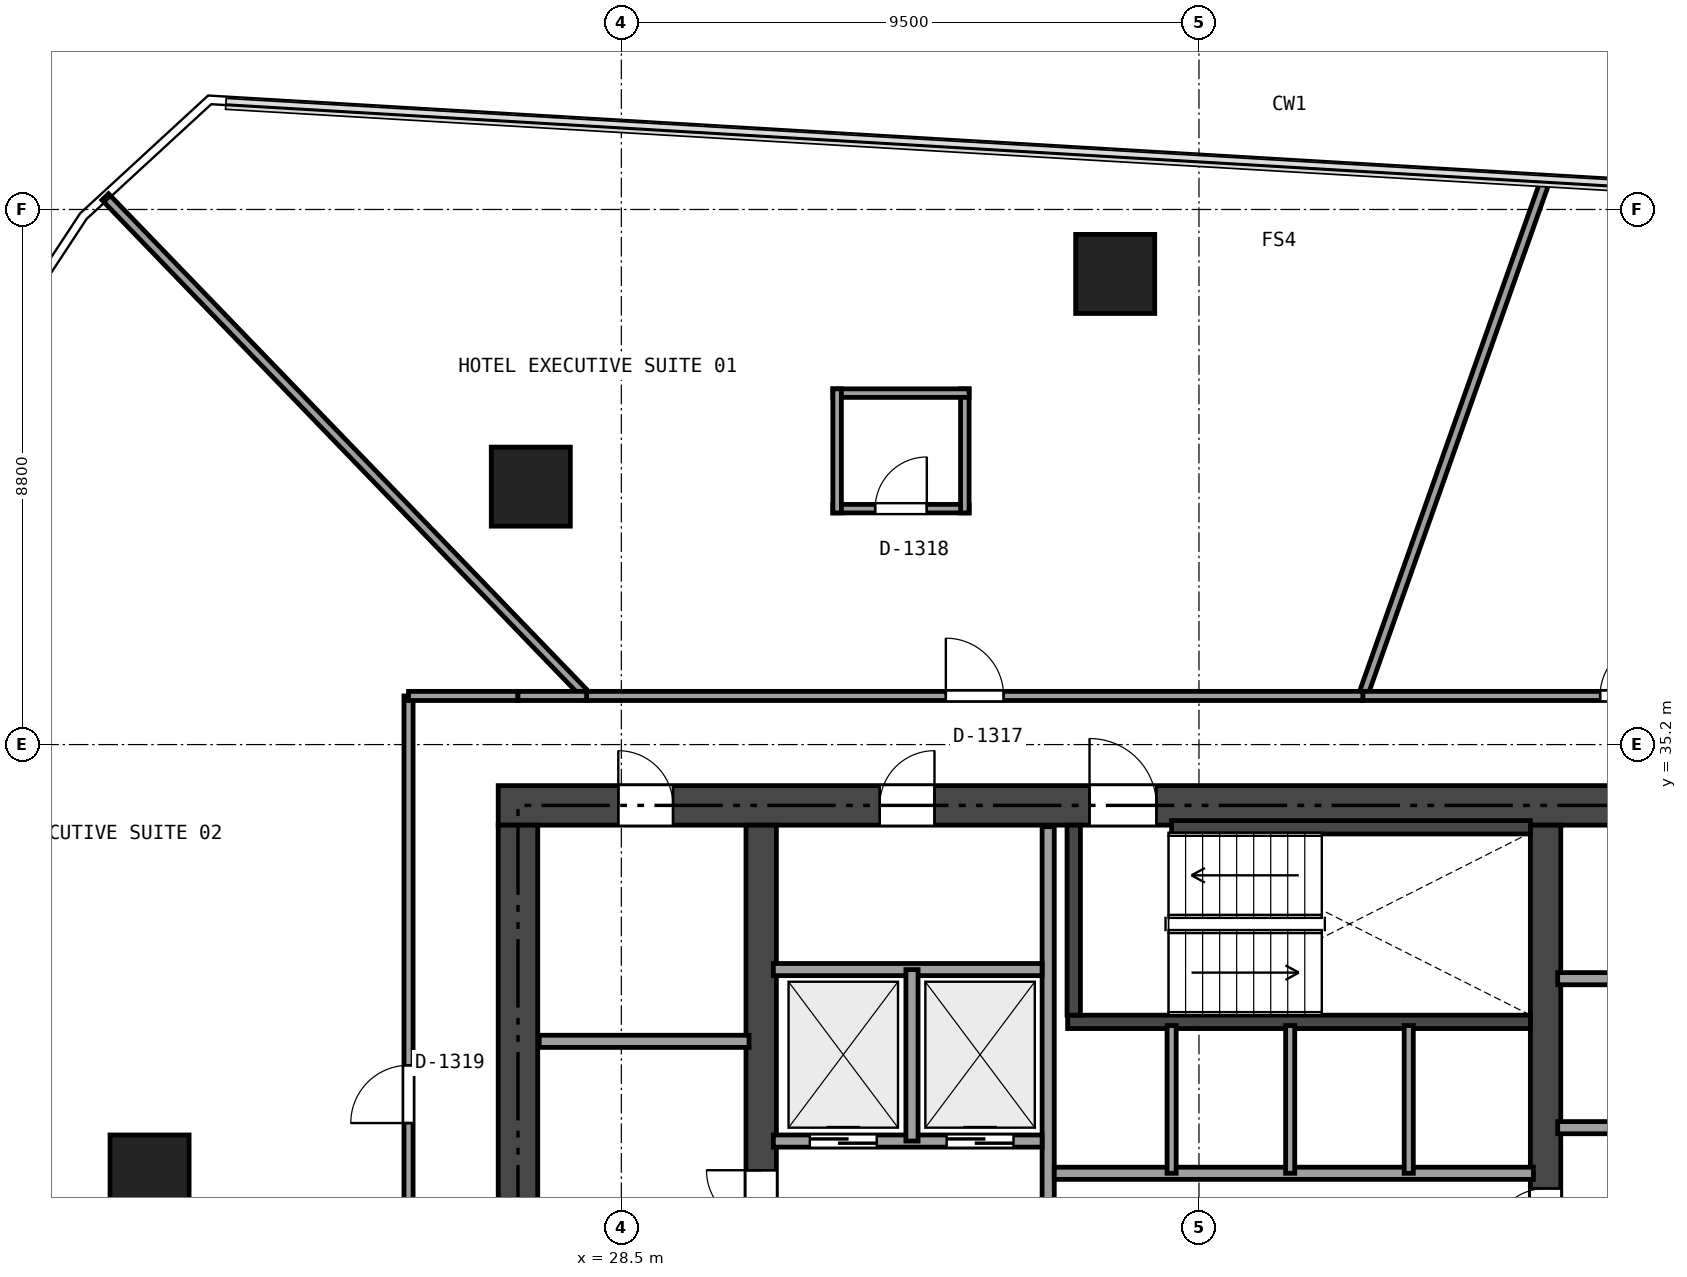
"""IFC4 building model, lengths in metres.
Left out: names, types, materials, properties, quantities, classifications, styles, units other than length and angle.
Written with IfcOpenShell. Run it as: python <this file> out.ifc"""

import sys

from ifc_helpers import new_model, si_unit, direction, frame, frame_2d, origin, origin_2d, place, context, subcontext, project, spatial, rectangle, extrude, element, fill, save


model = new_model("IFC4")
c1 = context("Model", 3, precision=1e-05, world=origin(), true_north=direction((0.0, 1.0)))
c2 = subcontext(c1, "Body", "Model", "MODEL_VIEW")
j1 = project(units=[si_unit("LENGTHUNIT", "METRE"), si_unit("PLANEANGLEUNIT", "RADIAN")], contexts=[c1])
p1 = place(None, origin())
s1 = spatial("IfcSite", under=j1, at=p1, CompositionType="ELEMENT")
p2 = place(p1, origin())
s2 = spatial("IfcBuilding", under=s1, at=p2, CompositionType="ELEMENT")
p3 = place(p2, frame((0.0, 0.0, 54.6)))
s3 = spatial("IfcBuildingStorey", under=s2, at=p3, CompositionType="ELEMENT", Elevation=54.6)
p4 = place(p3, frame((26.475, 34.2, 0.0), z_axis=(0.0, 0.0, 1.0), x_axis=(1.0, 0.0, 0.0)))
e1 = element("IfcWall", 1, at=p4, inside=s3, PredefinedType="SHEAR", context=c2, shape_type="SweptSolid", body=[
    extrude(rectangle(XDim=21.45, YDim=0.65, at=frame_2d((10.725, 0.0))), origin(), (0.0, 0.0, 1.0), 3.17),
])
p5 = place(p4, frame((9.725, 0.0, 0.0)))
e2 = element("IfcOpeningElement", 2, at=p5, cuts=e1, PredefinedType="OPENING", context=c2, shape_type="SweptSolid", body=[
    extrude(rectangle(XDim=1.1, YDim=2.15, at=frame_2d((0.55, 1.075))), frame((0.0, 0.335, 0.0), z_axis=(0.0, -1.0, 0.0), x_axis=(1.0, 0.0, 0.0)), (0.0, 0.0, 1.0), 0.67),
])
p6 = place(p4, frame((1.975, 0.0, 0.0)))
e3 = element("IfcOpeningElement", 3, at=p6, cuts=e1, PredefinedType="OPENING", context=c2, shape_type="SweptSolid", body=[
    extrude(rectangle(XDim=0.9, YDim=2.1, at=frame_2d((0.45, 1.05))), frame((0.0, 0.335, 0.0), z_axis=(0.0, -1.0, 0.0), x_axis=(1.0, 0.0, 0.0)), (0.0, 0.0, 1.0), 0.67),
])
p7 = place(p4, frame((6.275, 0.0, 0.0)))
e4 = element("IfcOpeningElement", 4, at=p7, cuts=e1, PredefinedType="OPENING", context=c2, shape_type="SweptSolid", body=[
    extrude(rectangle(XDim=0.9, YDim=2.1, at=frame_2d((0.45, 1.05))), frame((0.0, 0.335, 0.0), z_axis=(0.0, -1.0, 0.0), x_axis=(1.0, 0.0, 0.0)), (0.0, 0.0, 1.0), 0.67),
])
p8 = place(p3, frame((26.8, 18.925, 0.0), z_axis=(0.0, 0.0, 1.0), x_axis=(0.0, 1.0, 0.0)))
e5 = element("IfcWall", 5, at=p8, inside=s3, PredefinedType="SHEAR", context=c2, shape_type="SweptSolid", body=[
    extrude(rectangle(XDim=14.95, YDim=0.65, at=frame_2d((7.475, 0.0))), origin(), (0.0, 0.0, 1.0), 3.17),
])
p9 = place(p3, frame((30.8, 18.925, 0.0), z_axis=(0.0, 0.0, 1.0), x_axis=(0.0, 1.0, 0.0)))
e6 = element("IfcWall", 6, at=p9, inside=s3, PredefinedType="SHEAR", context=c2, shape_type="SweptSolid", body=[
    extrude(rectangle(XDim=14.95, YDim=0.5, at=frame_2d((7.475, 0.0))), origin(), (0.0, 0.0, 1.0), 3.17),
])
p10 = place(p9, frame((6.575, 0.0, 0.0)))
e7 = element("IfcOpeningElement", 7, at=p10, cuts=e6, PredefinedType="OPENING", context=c2, shape_type="SweptSolid", body=[
    extrude(rectangle(XDim=1.1, YDim=2.15, at=frame_2d((0.55, 1.075))), frame((0.0, 0.26, 0.0), z_axis=(0.0, -1.0, 0.0), x_axis=(1.0, 0.0, 0.0)), (0.0, 0.0, 1.0), 0.52),
])
p11 = place(p9, frame((8.375, 0.0, 0.0)))
e8 = element("IfcOpeningElement", 8, at=p11, cuts=e6, PredefinedType="OPENING", context=c2, shape_type="SweptSolid", body=[
    extrude(rectangle(XDim=0.9, YDim=2.1, at=frame_2d((0.45, 1.05))), frame((0.0, 0.26, 0.0), z_axis=(0.0, -1.0, 0.0), x_axis=(1.0, 0.0, 0.0)), (0.0, 0.0, 1.0), 0.52),
])
p12 = place(p3, frame((43.7, 18.925, 0.0), z_axis=(0.0, 0.0, 1.0), x_axis=(0.0, 1.0, 0.0)))
e9 = element("IfcWall", 9, at=p12, inside=s3, PredefinedType="SHEAR", context=c2, shape_type="SweptSolid", body=[
    extrude(rectangle(XDim=14.95, YDim=0.5, at=frame_2d((7.475, 0.0))), origin(), (0.0, 0.0, 1.0), 3.17),
])
p13 = place(p12, frame((8.075, 0.0, 0.0)))
e10 = element("IfcOpeningElement", 10, at=p13, cuts=e9, PredefinedType="OPENING", context=c2, shape_type="SweptSolid", body=[
    extrude(rectangle(XDim=0.9, YDim=2.1, at=frame_2d((0.45, 1.05))), frame((0.0, 0.26, 0.0), z_axis=(0.0, -1.0, 0.0), x_axis=(1.0, 0.0, 0.0)), (0.0, 0.0, 1.0), 0.52),
])
p14 = place(p3, frame((35.84, 30.64, 0.0), z_axis=(0.0, 0.0, 1.0), x_axis=(1.0, 0.0, 0.0)))
e11 = element("IfcWall", 11, at=p14, inside=s3, PredefinedType="SHEAR", context=c2, shape_type="SweptSolid", body=[
    extrude(rectangle(XDim=7.61, YDim=0.22, at=frame_2d((3.805, 0.0))), origin(), (0.0, 0.0, 1.0), 3.17),
])
p15 = place(p3, frame((35.94, 30.75, 0.0), z_axis=(0.0, 0.0, 1.0), x_axis=(0.0, 1.0, 0.0)))
e12 = element("IfcWall", 12, at=p15, inside=s3, PredefinedType="SHEAR", context=c2, shape_type="SweptSolid", body=[
    extrude(rectangle(XDim=3.125, YDim=0.22, at=frame_2d((1.562, 0.0))), origin(), (0.0, 0.0, 1.0), 3.17),
])
p16 = place(p3, frame((37.55, 33.84, 0.0), z_axis=(0.0, 0.0, 1.0), x_axis=(1.0, 0.0, 0.0)))
e13 = element("IfcWall", 13, at=p16, inside=s3, PredefinedType="SHEAR", context=c2, shape_type="SweptSolid", body=[
    extrude(rectangle(XDim=5.9, YDim=0.22, at=frame_2d((2.95, 0.0))), origin(), (0.0, 0.0, 1.0), 3.17),
])
for number, where, z_axis, x_axis in (
    (14, (36.622, 42.94, 0.0), (0.0, 0.0, 1.0), (1.0, 0.0, 0.0)),
    (15, (27.011, 39.442, 0.0), (0.0, 0.0, 1.0), (1.0, 0.0, 0.0)),
    (16, (20.741, 28.13, 0.0), (0.0, 0.0, 1.0), (1.0, 0.0, 0.0)),
):
    element("IfcColumn", number, at=place(p3, frame(where, z_axis=z_axis, x_axis=x_axis)), inside=s3, PredefinedType="COLUMN", context=c2, shape_type="SweptSolid", body=[
        extrude(rectangle(XDim=1.3, YDim=1.3, at=origin_2d()), origin(), (0.0, 0.0, 1.0), 3.17),
    ])
p17 = place(p3, frame((27.15, 30.32, 0.0), z_axis=(0.0, 0.0, 1.0), x_axis=(1.0, 0.0, 0.0)))
e17 = element("IfcWall", 17, at=p17, inside=s3, PredefinedType="SOLIDWALL", context=c2, shape_type="SweptSolid", body=[
    extrude(rectangle(XDim=3.45, YDim=0.2, at=frame_2d((1.725, 0.0))), origin(), (0.0, 0.0, 1.0), 3.17),
])
p18 = place(p3, frame((43.9, 28.9, 0.0), z_axis=(0.0, 0.0, 1.0), x_axis=(1.0, 0.0, 0.0)))
e18 = element("IfcWall", 18, at=p18, inside=s3, PredefinedType="SOLIDWALL", context=c2, shape_type="SweptSolid", body=[
    extrude(rectangle(XDim=3.35, YDim=0.2, at=frame_2d((1.675, 0.0))), origin(), (0.0, 0.0, 1.0), 3.17),
])
p19 = place(p18, frame((1.15, 0.0, 0.0)))
e19 = element("IfcOpeningElement", 19, at=p19, cuts=e18, PredefinedType="OPENING", context=c2, shape_type="SweptSolid", body=[
    extrude(rectangle(XDim=0.9, YDim=2.1, at=frame_2d((0.45, 1.05))), frame((0.0, 0.11, 0.0), z_axis=(0.0, -1.0, 0.0), x_axis=(1.0, 0.0, 0.0)), (0.0, 0.0, 1.0), 0.22),
])
p20 = place(p3, frame((43.9, 31.35, 0.0), z_axis=(0.0, 0.0, 1.0), x_axis=(1.0, 0.0, 0.0)))
e20 = element("IfcWall", 20, at=p20, inside=s3, PredefinedType="SOLIDWALL", context=c2, shape_type="SweptSolid", body=[
    extrude(rectangle(XDim=3.35, YDim=0.2, at=frame_2d((1.675, 0.0))), origin(), (0.0, 0.0, 1.0), 3.17),
])
p21 = place(p3, frame((35.52, 18.95, 0.0), z_axis=(0.0, 0.0, 1.0), x_axis=(0.0, 1.0, 0.0)))
e21 = element("IfcWall", 21, at=p21, inside=s3, PredefinedType="SOLIDWALL", context=c2, shape_type="SweptSolid", body=[
    extrude(rectangle(XDim=14.9, YDim=0.2, at=frame_2d((7.45, 0.0))), origin(), (0.0, 0.0, 1.0), 2.691),
])
p22 = place(p21, frame((7.755, 0.0, 0.0)))
e22 = element("IfcOpeningElement", 22, at=p22, cuts=e21, PredefinedType="OPENING", context=c2, shape_type="SweptSolid", body=[
    extrude(rectangle(XDim=0.95, YDim=2.15, at=frame_2d((0.475, 1.075))), frame((0.0, 0.11, 0.0), z_axis=(0.0, -1.0, 0.0), x_axis=(1.0, 0.0, 0.0)), (0.0, 0.0, 1.0), 0.22),
])
p23 = place(p21, frame((0.6, 0.0, 0.0)))
e23 = element("IfcOpeningElement", 23, at=p23, cuts=e21, PredefinedType="OPENING", context=c2, shape_type="SweptSolid", body=[
    extrude(rectangle(XDim=0.9, YDim=2.1, at=frame_2d((0.45, 1.05))), frame((0.0, 0.11, 0.0), z_axis=(0.0, -1.0, 0.0), x_axis=(1.0, 0.0, 0.0)), (0.0, 0.0, 1.0), 0.22),
])
p24 = place(p3, frame((31.0, 28.68, 0.0), z_axis=(0.0, 0.0, 1.0), x_axis=(1.0, 0.0, 0.0)))
e24 = element("IfcWall", 24, at=p24, inside=s3, PredefinedType="SOLIDWALL", context=c2, shape_type="SweptSolid", body=[
    extrude(rectangle(XDim=4.42, YDim=0.2, at=frame_2d((2.21, 0.0))), origin(), (0.0, 0.0, 1.0), 3.17),
])
p25 = place(p24, frame((0.6, 0.0, 0.0)))
e25 = element("IfcOpeningElement", 25, at=p25, cuts=e24, PredefinedType="OPENING", context=c2, shape_type="SweptSolid", body=[
    extrude(rectangle(XDim=1.1, YDim=2.15, at=frame_2d((0.55, 1.075))), frame((0.0, 0.11, 0.0), z_axis=(0.0, -1.0, 0.0), x_axis=(1.0, 0.0, 0.0)), (0.0, 0.0, 1.0), 0.22),
])
p26 = place(p24, frame((2.85, 0.0, 0.0)))
e26 = element("IfcOpeningElement", 26, at=p26, cuts=e24, PredefinedType="OPENING", context=c2, shape_type="SweptSolid", body=[
    extrude(rectangle(XDim=1.1, YDim=2.15, at=frame_2d((0.55, 1.075))), frame((0.0, 0.11, 0.0), z_axis=(0.0, -1.0, 0.0), x_axis=(1.0, 0.0, 0.0)), (0.0, 0.0, 1.0), 0.22),
])
p27 = place(p3, frame((31.0, 31.5, 0.0), z_axis=(0.0, 0.0, 1.0), x_axis=(1.0, 0.0, 0.0)))
e27 = element("IfcWall", 27, at=p27, inside=s3, PredefinedType="SOLIDWALL", context=c2, shape_type="SweptSolid", body=[
    extrude(rectangle(XDim=4.42, YDim=0.2, at=frame_2d((2.21, 0.0))), origin(), (0.0, 0.0, 1.0), 3.17),
])
p28 = place(p3, frame((33.28, 28.68, 0.0), z_axis=(0.0, 0.0, 1.0), x_axis=(0.0, 1.0, 0.0)))
e28 = element("IfcWall", 28, at=p28, inside=s3, PredefinedType="SOLIDWALL", context=c2, shape_type="SweptSolid", body=[
    extrude(rectangle(XDim=2.82, YDim=0.2, at=frame_2d((1.41, 0.0))), origin(), (0.0, 0.0, 1.0), 3.17),
])
p29 = place(p3, frame((35.62, 28.15, 0.0), z_axis=(0.0, 0.0, 1.0), x_axis=(1.0, 0.0, 0.0)))
e29 = element("IfcWall", 29, at=p29, inside=s3, PredefinedType="SOLIDWALL", context=c2, shape_type="SweptSolid", body=[
    extrude(rectangle(XDim=7.88, YDim=0.2, at=frame_2d((3.94, 0.0))), origin(), (0.0, 0.0, 1.0), 3.17),
])
for number, where, z_axis, x_axis in (
    (30, (37.55, 28.15, 0.0), (0.0, 0.0, 1.0), (0.0, 1.0, 0.0)),
    (31, (39.5, 28.15, 0.0), (0.0, 0.0, 1.0), (0.0, 1.0, 0.0)),
    (32, (41.45, 28.15, 0.0), (0.0, 0.0, 1.0), (0.0, 1.0, 0.0)),
):
    element("IfcWall", number, at=place(p3, frame(where, z_axis=z_axis, x_axis=x_axis)), inside=s3, PredefinedType="PARTITIONING", context=c2, shape_type="SweptSolid", body=[
        extrude(rectangle(XDim=2.43, YDim=0.15, at=frame_2d((1.215, 0.0))), origin(), (0.0, 0.0, 1.0), 3.17),
    ])
p30 = place(p3, frame((31.979, 39.08, 0.0), z_axis=(0.0, 0.0, 1.0), x_axis=(1.0, 0.0, 0.0)))
e33 = element("IfcWall", 33, at=p30, inside=s3, PredefinedType="PARTITIONING", context=c2, shape_type="SweptSolid", body=[
    extrude(rectangle(XDim=2.24, YDim=0.14, at=frame_2d((1.12, 0.0))), origin(), (0.0, 0.0, 1.0), 2.747),
])
p31 = place(p30, frame((0.695, 0.0, 0.0)))
e34 = element("IfcOpeningElement", 34, at=p31, cuts=e33, PredefinedType="OPENING", context=c2, shape_type="SweptSolid", body=[
    extrude(rectangle(XDim=0.85, YDim=2.1, at=frame_2d((0.425, 1.05))), frame((0.0, 0.08, 0.0), z_axis=(0.0, -1.0, 0.0), x_axis=(1.0, 0.0, 0.0)), (0.0, 0.0, 1.0), 0.16),
])
p32 = place(p3, frame((34.149, 39.01, 0.0), z_axis=(0.0, 0.0, 1.0), x_axis=(0.0, 1.0, 0.0)))
e35 = element("IfcWall", 35, at=p32, inside=s3, PredefinedType="PARTITIONING", context=c2, shape_type="SweptSolid", body=[
    extrude(rectangle(XDim=2.04, YDim=0.14, at=frame_2d((1.02, 0.0))), origin(), (0.0, 0.0, 1.0), 2.747),
])
p33 = place(p3, frame((34.219, 40.98, 0.0), z_axis=(0.0, 0.0, 1.0), x_axis=(-1.0, 0.0, 0.0)))
e36 = element("IfcWall", 36, at=p33, inside=s3, PredefinedType="PARTITIONING", context=c2, shape_type="SweptSolid", body=[
    extrude(rectangle(XDim=2.24, YDim=0.14, at=frame_2d((1.12, 0.0))), origin(), (0.0, 0.0, 1.0), 3.17),
])
p34 = place(p3, frame((32.049, 41.05, 0.0), z_axis=(0.0, 0.0, 1.0), x_axis=(0.0, -1.0, 0.0)))
e37 = element("IfcWall", 37, at=p34, inside=s3, PredefinedType="PARTITIONING", context=c2, shape_type="SweptSolid", body=[
    extrude(rectangle(XDim=2.04, YDim=0.14, at=frame_2d((1.02, 0.0))), origin(), (0.0, 0.0, 1.0), 3.17),
])
p35 = place(p3, frame((43.705, 44.505, 0.0), z_axis=(0.0, 0.0, 1.0), x_axis=(-0.333732929856, -0.942667667595, 0.0)))
e38 = element("IfcWall", 38, at=p35, inside=s3, PredefinedType="PARTITIONING", context=c2, shape_type="SweptSolid", body=[
    extrude(rectangle(XDim=9.022, YDim=0.15, at=frame_2d((4.511, 0.0))), origin(), (0.0, 0.0, 1.0), 2.355),
])
p36 = place(p3, frame((40.694, 36.0, 0.0), z_axis=(0.0, 0.0, 1.0), x_axis=(1.0, 0.0, 0.0)))
e39 = element("IfcWall", 39, at=p36, inside=s3, PredefinedType="PARTITIONING", context=c2, shape_type="SweptSolid", body=[
    extrude(rectangle(XDim=8.706, YDim=0.15, at=frame_2d((4.353, 0.0))), origin(), (0.0, 0.0, 1.0), 2.355),
])
p37 = place(p36, frame((3.903, 0.0, 0.0)))
e40 = element("IfcOpeningElement", 40, at=p37, cuts=e39, PredefinedType="OPENING", context=c2, shape_type="SweptSolid", body=[
    extrude(rectangle(XDim=0.9, YDim=2.0, at=frame_2d((0.45, 1.0))), frame((0.0, 0.085, 0.0), z_axis=(0.0, -1.0, 0.0), x_axis=(1.0, 0.0, 0.0)), (0.0, 0.0, 1.0), 0.17),
])
p38 = place(p3, frame((20.012, 44.207, 0.0), z_axis=(0.0, 0.0, 1.0), x_axis=(0.694275025098, -0.719709795352, 0.0)))
e41 = element("IfcWall", 41, at=p38, inside=s3, PredefinedType="PARTITIONING", context=c2, shape_type="SweptSolid", body=[
    extrude(rectangle(XDim=11.403, YDim=0.15, at=frame_2d((5.702, 0.0))), origin(), (0.0, 0.0, 1.0), 2.355),
])
p39 = place(p3, frame((27.929, 36.0, 0.0), z_axis=(0.0, 0.0, 1.0), x_axis=(1.0, 0.0, 0.0)))
e42 = element("IfcWall", 42, at=p39, inside=s3, PredefinedType="PARTITIONING", context=c2, shape_type="SweptSolid", body=[
    extrude(rectangle(XDim=12.765, YDim=0.15, at=frame_2d((6.383, 0.0))), origin(), (0.0, 0.0, 1.0), 2.395),
])
p40 = place(p39, frame((5.908, 0.0, 0.0)))
e43 = element("IfcOpeningElement", 43, at=p40, cuts=e42, PredefinedType="OPENING", context=c2, shape_type="SweptSolid", body=[
    extrude(rectangle(XDim=0.95, YDim=2.15, at=frame_2d((0.475, 1.075))), frame((0.0, 0.085, 0.0), z_axis=(0.0, -1.0, 0.0), x_axis=(1.0, 0.0, 0.0)), (0.0, 0.0, 1.0), 0.17),
])
p41 = place(p3, frame((25.0, 22.902, 0.0), z_axis=(0.0, 0.0, 1.0), x_axis=(0.0, 1.0, 0.0)))
e44 = element("IfcWall", 44, at=p41, inside=s3, PredefinedType="PARTITIONING", context=c2, shape_type="SweptSolid", body=[
    extrude(rectangle(XDim=13.098, YDim=0.15, at=frame_2d((6.549, 0.0))), origin(), (0.0, 0.0, 1.0), 2.355),
])
p42 = place(p41, frame((6.074, 0.0, 0.0)))
e45 = element("IfcOpeningElement", 45, at=p42, cuts=e44, PredefinedType="OPENING", context=c2, shape_type="SweptSolid", body=[
    extrude(rectangle(XDim=0.95, YDim=2.15, at=frame_2d((0.475, 1.075))), frame((0.0, 0.085, 0.0), z_axis=(0.0, -1.0, 0.0), x_axis=(1.0, 0.0, 0.0)), (0.0, 0.0, 1.0), 0.17),
])
p43 = place(p3, frame((25.0, 36.0, 0.0), z_axis=(0.0, 0.0, 1.0), x_axis=(1.0, 0.0, 0.0)))
e46 = element("IfcWall", 46, at=p43, inside=s3, PredefinedType="PARTITIONING", context=c2, shape_type="SweptSolid", body=[
    extrude(rectangle(XDim=1.8, YDim=0.15, at=frame_2d((0.9, 0.0))), origin(), (0.0, 0.0, 1.0), 2.355),
])
p44 = place(p3, frame((26.8, 36.0, 0.0), z_axis=(0.0, 0.0, 1.0), x_axis=(1.0, 0.0, 0.0)))
e47 = element("IfcWall", 47, at=p44, inside=s3, PredefinedType="PARTITIONING", context=c2, shape_type="SweptSolid", body=[
    extrude(rectangle(XDim=1.129, YDim=0.15, at=frame_2d((0.564, 0.0))), origin(), (0.0, 0.0, 1.0), 2.747),
])
p45 = place(p5, origin())
e48 = element("IfcDoor", 48, at=p45, inside=s3, OperationType="SINGLE_SWING_LEFT", PredefinedType="DOOR", context=c2, shape_type="SweptSolid", body=[
    extrude(rectangle(XDim=1.1, YDim=2.15, at=frame_2d((0.55, 1.075))), frame((0.0, 0.025, 0.0), z_axis=(0.0, -1.0, 0.0), x_axis=(1.0, 0.0, 0.0)), (0.0, 0.0, 1.0), 0.05),
])
fill(e2, e48)
p46 = place(p13, origin())
e49 = element("IfcDoor", 49, at=p46, inside=s3, OperationType="SINGLE_SWING_LEFT", PredefinedType="DOOR", context=c2, shape_type="SweptSolid", body=[
    extrude(rectangle(XDim=0.9, YDim=2.1, at=frame_2d((0.45, 1.05))), frame((0.0, 0.025, 0.0), z_axis=(0.0, -1.0, 0.0), x_axis=(1.0, 0.0, 0.0)), (0.0, 0.0, 1.0), 0.05),
])
fill(e10, e49)
p47 = place(p11, origin())
e50 = element("IfcDoor", 50, at=p47, inside=s3, OperationType="SINGLE_SWING_RIGHT", PredefinedType="DOOR", context=c2, shape_type="SweptSolid", body=[
    extrude(rectangle(XDim=0.9, YDim=2.1, at=frame_2d((0.45, 1.05))), frame((0.0, 0.025, 0.0), z_axis=(0.0, -1.0, 0.0), x_axis=(1.0, 0.0, 0.0)), (0.0, 0.0, 1.0), 0.05),
])
fill(e8, e50)
p48 = place(p6, origin())
e51 = element("IfcDoor", 51, at=p48, inside=s3, OperationType="SINGLE_SWING_LEFT", PredefinedType="DOOR", context=c2, shape_type="SweptSolid", body=[
    extrude(rectangle(XDim=0.9, YDim=2.1, at=frame_2d((0.45, 1.05))), frame((0.0, 0.025, 0.0), z_axis=(0.0, -1.0, 0.0), x_axis=(1.0, 0.0, 0.0)), (0.0, 0.0, 1.0), 0.05),
])
fill(e3, e51)
p49 = place(p7, origin())
e52 = element("IfcDoor", 52, at=p49, inside=s3, OperationType="SINGLE_SWING_RIGHT", PredefinedType="DOOR", context=c2, shape_type="SweptSolid", body=[
    extrude(rectangle(XDim=0.9, YDim=2.1, at=frame_2d((0.45, 1.05))), frame((0.0, 0.025, 0.0), z_axis=(0.0, -1.0, 0.0), x_axis=(1.0, 0.0, 0.0)), (0.0, 0.0, 1.0), 0.05),
])
fill(e4, e52)
p50 = place(p25, origin())
e53 = element("IfcDoor", 53, at=p50, inside=s3, OperationType="SLIDING_TO_LEFT", PredefinedType="DOOR", context=c2, shape_type="SweptSolid", body=[
    extrude(rectangle(XDim=1.1, YDim=2.15, at=frame_2d((0.55, 1.075))), frame((0.0, 0.025, 0.0), z_axis=(0.0, -1.0, 0.0), x_axis=(1.0, 0.0, 0.0)), (0.0, 0.0, 1.0), 0.05),
])
fill(e25, e53)
p51 = place(p26, origin())
e54 = element("IfcDoor", 54, at=p51, inside=s3, OperationType="SLIDING_TO_LEFT", PredefinedType="DOOR", context=c2, shape_type="SweptSolid", body=[
    extrude(rectangle(XDim=1.1, YDim=2.15, at=frame_2d((0.55, 1.075))), frame((0.0, 0.025, 0.0), z_axis=(0.0, -1.0, 0.0), x_axis=(1.0, 0.0, 0.0)), (0.0, 0.0, 1.0), 0.05),
])
fill(e26, e54)
p52 = place(p37, origin())
e55 = element("IfcDoor", 55, at=p52, inside=s3, OperationType="SINGLE_SWING_RIGHT", PredefinedType="DOOR", context=c2, shape_type="SweptSolid", body=[
    extrude(rectangle(XDim=0.9, YDim=2.0, at=frame_2d((0.45, 1.0))), frame((0.0, 0.025, 0.0), z_axis=(0.0, -1.0, 0.0), x_axis=(1.0, 0.0, 0.0)), (0.0, 0.0, 1.0), 0.05),
])
fill(e40, e55)
p53 = place(p40, origin())
e56 = element("IfcDoor", 56, at=p53, inside=s3, OperationType="SINGLE_SWING_LEFT", PredefinedType="DOOR", context=c2, shape_type="SweptSolid", body=[
    extrude(rectangle(XDim=0.95, YDim=2.15, at=frame_2d((0.475, 1.075))), frame((0.0, 0.025, 0.0), z_axis=(0.0, -1.0, 0.0), x_axis=(1.0, 0.0, 0.0)), (0.0, 0.0, 1.0), 0.05),
])
fill(e43, e56)
p54 = place(p31, origin())
e57 = element("IfcDoor", 57, at=p54, inside=s3, OperationType="SINGLE_SWING_RIGHT", PredefinedType="DOOR", context=c2, shape_type="SweptSolid", body=[
    extrude(rectangle(XDim=0.85, YDim=2.1, at=frame_2d((0.425, 1.05))), frame((0.0, 0.025, 0.0), z_axis=(0.0, -1.0, 0.0), x_axis=(1.0, 0.0, 0.0)), (0.0, 0.0, 1.0), 0.05),
])
fill(e34, e57)
p55 = place(p42, origin())
e58 = element("IfcDoor", 58, at=p55, inside=s3, OperationType="SINGLE_SWING_LEFT", PredefinedType="DOOR", context=c2, shape_type="SweptSolid", body=[
    extrude(rectangle(XDim=0.95, YDim=2.15, at=frame_2d((0.475, 1.075))), frame((0.0, 0.025, 0.0), z_axis=(0.0, -1.0, 0.0), x_axis=(1.0, 0.0, 0.0)), (0.0, 0.0, 1.0), 0.05),
])
fill(e45, e58)
save(model, sys.argv[1])
